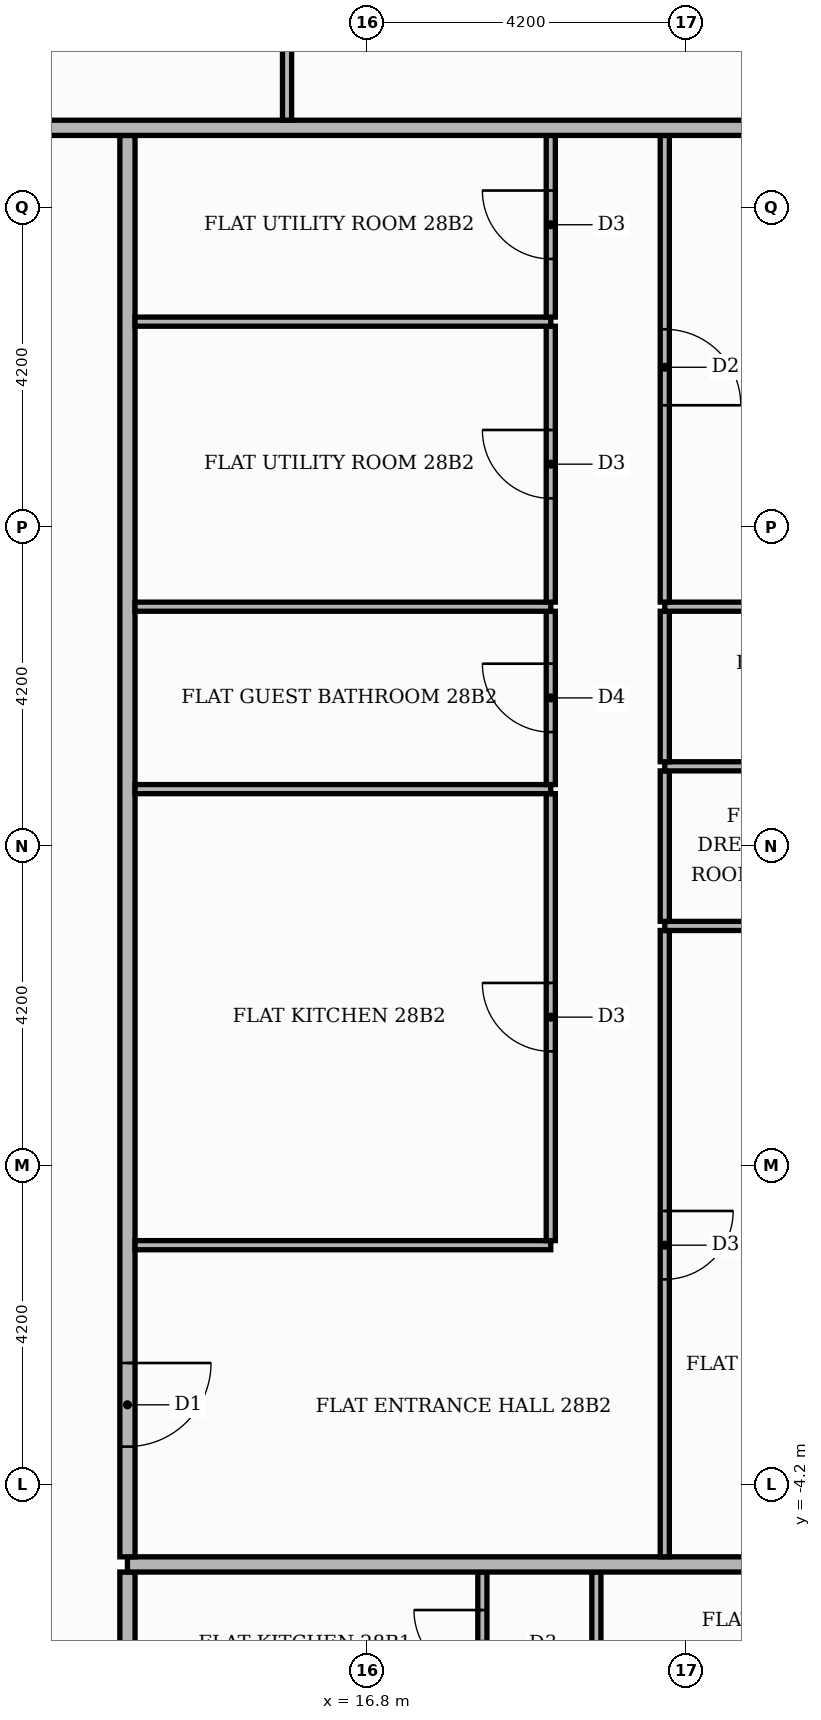
"""IFC4 building model, lengths in metres.
Left out: names, types, materials, properties, quantities, classifications, styles, units other than length and angle.
Written with IfcOpenShell. Run it as: python <this file> out.ifc"""

import sys

from ifc_helpers import new_model, si_unit, direction, frame, frame_2d, origin, place, context, subcontext, project, spatial, rectangle, extrude, element, fill, save


model = new_model("IFC4")
c1 = context("Model", 3, precision=1e-05, world=origin(), true_north=direction((0.0, 1.0)))
c2 = subcontext(c1, "Body", "Model", "MODEL_VIEW")
j1 = project(units=[si_unit("LENGTHUNIT", "METRE"), si_unit("PLANEANGLEUNIT", "RADIAN")], contexts=[c1])
p1 = place(None, origin())
s1 = spatial("IfcSite", under=j1, at=p1, CompositionType="ELEMENT")
p2 = place(p1, origin())
s2 = spatial("IfcBuilding", under=s1, at=p2, CompositionType="ELEMENT")
p3 = place(p2, frame((0.0, 0.0, 118.2)))
s3 = spatial("IfcBuildingStorey", under=s2, at=p3, CompositionType="ELEMENT", Elevation=118.2)
p4 = place(p3, frame((13.65, -13.55, 0.0), z_axis=(0.0, 0.0, 1.0), x_axis=(0.0, 1.0, 0.0)))
e1 = element("IfcWall", 1, at=p4, inside=s3, PredefinedType="PARTITIONING", context=c2, shape_type="SweptSolid", body=[
    extrude(rectangle(XDim=8.2, YDim=0.2, at=frame_2d((4.1, 0.0))), origin(), (0.0, 0.0, 1.0), 3.48),
])
p5 = place(p4, frame((1.45, 0.0, 0.0)))
e2 = element("IfcOpeningElement", 2, at=p5, cuts=e1, PredefinedType="OPENING", context=c2, shape_type="SweptSolid", body=[
    extrude(rectangle(XDim=1.1, YDim=2.4, at=frame_2d((0.55, 1.2))), frame((0.0, 0.11, 0.0), z_axis=(0.0, -1.0, 0.0), x_axis=(1.0, 0.0, 0.0)), (0.0, 0.0, 1.0), 0.22),
])
p6 = place(p3, frame((18.32, -7.29, 0.0), z_axis=(0.0, 0.0, 1.0), x_axis=(0.0, 1.0, 0.0)))
e3 = element("IfcWall", 3, at=p6, inside=s3, PredefinedType="PARTITIONING", context=c2, shape_type="SweptSolid", body=[
    extrude(rectangle(XDim=1.94, YDim=0.12, at=frame_2d((0.97, 0.0))), origin(), (0.0, 0.0, 1.0), 3.48),
])
p7 = place(p6, frame((0.54, 0.0, 0.0)))
e4 = element("IfcOpeningElement", 4, at=p7, cuts=e3, PredefinedType="OPENING", context=c2, shape_type="SweptSolid", body=[
    extrude(rectangle(XDim=0.9, YDim=2.1, at=frame_2d((0.45, 1.05))), frame((0.0, 0.07, 0.0), z_axis=(0.0, -1.0, 0.0), x_axis=(1.0, 0.0, 0.0)), (0.0, 0.0, 1.0), 0.14),
])
p8 = place(p3, frame((19.82, -7.29, 0.0), z_axis=(0.0, 0.0, 1.0), x_axis=(0.0, 1.0, 0.0)))
e5 = element("IfcWall", 5, at=p8, inside=s3, PredefinedType="PARTITIONING", context=c2, shape_type="SweptSolid", body=[
    extrude(rectangle(XDim=1.94, YDim=0.12, at=frame_2d((0.97, 0.0))), origin(), (0.0, 0.0, 1.0), 3.48),
])
p9 = place(p3, frame((13.65, -5.25, 0.0), z_axis=(0.0, 0.0, 1.0), x_axis=(1.0, 0.0, 0.0)))
e6 = element("IfcWall", 6, at=p9, inside=s3, PredefinedType="PARTITIONING", context=c2, shape_type="SweptSolid", body=[
    extrude(rectangle(XDim=11.77, YDim=0.2, at=frame_2d((5.885, 0.0))), origin(), (0.0, 0.0, 1.0), 3.48),
])
p10 = place(p3, frame((13.65, -5.15, 0.0), z_axis=(0.0, 0.0, 1.0), x_axis=(0.0, 1.0, 0.0)))
e7 = element("IfcWall", 7, at=p10, inside=s3, PredefinedType="PARTITIONING", context=c2, shape_type="SweptSolid", body=[
    extrude(rectangle(XDim=18.7, YDim=0.2, at=frame_2d((9.35, 0.0))), origin(), (0.0, 0.0, 1.0), 3.48),
])
p11 = place(p10, frame((1.45, 0.0, 0.0)))
e8 = element("IfcOpeningElement", 8, at=p11, cuts=e7, PredefinedType="OPENING", context=c2, shape_type="SweptSolid", body=[
    extrude(rectangle(XDim=1.1, YDim=2.4, at=frame_2d((0.55, 1.2))), frame((0.0, 0.11, 0.0), z_axis=(0.0, -1.0, 0.0), x_axis=(1.0, 0.0, 0.0)), (0.0, 0.0, 1.0), 0.22),
])
p12 = place(p3, frame((20.72, -5.15, 0.0), z_axis=(0.0, 0.0, 1.0), x_axis=(0.0, 1.0, 0.0)))
e9 = element("IfcWall", 9, at=p12, inside=s3, PredefinedType="PARTITIONING", context=c2, shape_type="SweptSolid", body=[
    extrude(rectangle(XDim=8.24, YDim=0.12, at=frame_2d((4.12, 0.0))), origin(), (0.0, 0.0, 1.0), 3.48),
])
p13 = place(p12, frame((3.65, 0.0, 0.0)))
e10 = element("IfcOpeningElement", 10, at=p13, cuts=e9, PredefinedType="OPENING", context=c2, shape_type="SweptSolid", body=[
    extrude(rectangle(XDim=0.9, YDim=2.1, at=frame_2d((0.45, 1.05))), frame((0.0, 0.07, 0.0), z_axis=(0.0, -1.0, 0.0), x_axis=(1.0, 0.0, 0.0)), (0.0, 0.0, 1.0), 0.14),
])
p14 = place(p3, frame((13.75, -1.05, 0.0), z_axis=(0.0, 0.0, 1.0), x_axis=(1.0, 0.0, 0.0)))
e11 = element("IfcWall", 11, at=p14, inside=s3, PredefinedType="PARTITIONING", context=c2, shape_type="SweptSolid", body=[
    extrude(rectangle(XDim=5.47, YDim=0.12, at=frame_2d((2.735, 0.0))), origin(), (0.0, 0.0, 1.0), 3.48),
])
p15 = place(p3, frame((19.22, -0.99, 0.0), z_axis=(0.0, 0.0, 1.0), x_axis=(0.0, 1.0, 0.0)))
e12 = element("IfcWall", 12, at=p15, inside=s3, PredefinedType="PARTITIONING", context=c2, shape_type="SweptSolid", body=[
    extrude(rectangle(XDim=5.88, YDim=0.12, at=frame_2d((2.94, 0.0))), origin(), (0.0, 0.0, 1.0), 3.48),
])
p16 = place(p15, frame((2.49, 0.0, 0.0)))
e13 = element("IfcOpeningElement", 13, at=p16, cuts=e12, PredefinedType="OPENING", context=c2, shape_type="SweptSolid", body=[
    extrude(rectangle(XDim=0.9, YDim=2.1, at=frame_2d((0.45, 1.05))), frame((0.0, 0.07, 0.0), z_axis=(0.0, -1.0, 0.0), x_axis=(1.0, 0.0, 0.0)), (0.0, 0.0, 1.0), 0.14),
])
p17 = place(p3, frame((20.72, 3.15, 0.0), z_axis=(0.0, 0.0, 1.0), x_axis=(1.0, 0.0, 0.0)))
e14 = element("IfcWall", 14, at=p17, inside=s3, PredefinedType="PARTITIONING", context=c2, shape_type="SweptSolid", body=[
    extrude(rectangle(XDim=4.7, YDim=0.12, at=frame_2d((2.35, 0.0))), origin(), (0.0, 0.0, 1.0), 3.48),
])
p18 = place(p17, frame((2.05, 0.0, 0.0)))
e15 = element("IfcOpeningElement", 15, at=p18, cuts=e14, PredefinedType="OPENING", context=c2, shape_type="SweptSolid", body=[
    extrude(rectangle(XDim=0.9, YDim=2.1, at=frame_2d((0.45, 1.05))), frame((0.0, 0.07, 0.0), z_axis=(0.0, -1.0, 0.0), x_axis=(1.0, 0.0, 0.0)), (0.0, 0.0, 1.0), 0.14),
])
p19 = place(p3, frame((20.72, 3.21, 0.0), z_axis=(0.0, 0.0, 1.0), x_axis=(0.0, 1.0, 0.0)))
e16 = element("IfcWall", 16, at=p19, inside=s3, PredefinedType="PARTITIONING", context=c2, shape_type="SweptSolid", body=[
    extrude(rectangle(XDim=1.98, YDim=0.12, at=frame_2d((0.99, 0.0))), origin(), (0.0, 0.0, 1.0), 3.48),
])
p20 = place(p3, frame((13.75, 4.95, 0.0), z_axis=(0.0, 0.0, 1.0), x_axis=(1.0, 0.0, 0.0)))
e17 = element("IfcWall", 17, at=p20, inside=s3, PredefinedType="PARTITIONING", context=c2, shape_type="SweptSolid", body=[
    extrude(rectangle(XDim=5.47, YDim=0.12, at=frame_2d((2.735, 0.0))), origin(), (0.0, 0.0, 1.0), 3.48),
])
p21 = place(p3, frame((19.22, 5.01, 0.0), z_axis=(0.0, 0.0, 1.0), x_axis=(0.0, 1.0, 0.0)))
e18 = element("IfcWall", 18, at=p21, inside=s3, PredefinedType="PARTITIONING", context=c2, shape_type="SweptSolid", body=[
    extrude(rectangle(XDim=2.28, YDim=0.12, at=frame_2d((1.14, 0.0))), origin(), (0.0, 0.0, 1.0), 3.48),
])
p22 = place(p21, frame((0.69, 0.0, 0.0)))
e19 = element("IfcOpeningElement", 19, at=p22, cuts=e18, PredefinedType="OPENING", context=c2, shape_type="SweptSolid", body=[
    extrude(rectangle(XDim=0.9, YDim=2.1, at=frame_2d((0.45, 1.05))), frame((0.0, 0.07, 0.0), z_axis=(0.0, -1.0, 0.0), x_axis=(1.0, 0.0, 0.0)), (0.0, 0.0, 1.0), 0.14),
])
p23 = place(p3, frame((20.72, 5.25, 0.0), z_axis=(0.0, 0.0, 1.0), x_axis=(1.0, 0.0, 0.0)))
e20 = element("IfcWall", 20, at=p23, inside=s3, PredefinedType="PARTITIONING", context=c2, shape_type="SweptSolid", body=[
    extrude(rectangle(XDim=4.7, YDim=0.12, at=frame_2d((2.35, 0.0))), origin(), (0.0, 0.0, 1.0), 3.48),
])
p24 = place(p23, frame((2.05, 0.0, 0.0)))
e21 = element("IfcOpeningElement", 21, at=p24, cuts=e20, PredefinedType="OPENING", context=c2, shape_type="SweptSolid", body=[
    extrude(rectangle(XDim=0.9, YDim=2.1, at=frame_2d((0.45, 1.05))), frame((0.0, 0.07, 0.0), z_axis=(0.0, -1.0, 0.0), x_axis=(1.0, 0.0, 0.0)), (0.0, 0.0, 1.0), 0.14),
])
p25 = place(p3, frame((20.72, 5.31, 0.0), z_axis=(0.0, 0.0, 1.0), x_axis=(0.0, 1.0, 0.0)))
e22 = element("IfcWall", 22, at=p25, inside=s3, PredefinedType="PARTITIONING", context=c2, shape_type="SweptSolid", body=[
    extrude(rectangle(XDim=1.98, YDim=0.12, at=frame_2d((0.99, 0.0))), origin(), (0.0, 0.0, 1.0), 3.48),
])
p26 = place(p3, frame((13.75, 7.35, 0.0), z_axis=(0.0, 0.0, 1.0), x_axis=(1.0, 0.0, 0.0)))
e23 = element("IfcWall", 23, at=p26, inside=s3, PredefinedType="PARTITIONING", context=c2, shape_type="SweptSolid", body=[
    extrude(rectangle(XDim=5.47, YDim=0.12, at=frame_2d((2.735, 0.0))), origin(), (0.0, 0.0, 1.0), 3.48),
])
p27 = place(p3, frame((20.72, 7.35, 0.0), z_axis=(0.0, 0.0, 1.0), x_axis=(1.0, 0.0, 0.0)))
e24 = element("IfcWall", 24, at=p27, inside=s3, PredefinedType="PARTITIONING", context=c2, shape_type="SweptSolid", body=[
    extrude(rectangle(XDim=4.7, YDim=0.12, at=frame_2d((2.35, 0.0))), origin(), (0.0, 0.0, 1.0), 3.48),
])
p28 = place(p3, frame((19.22, 7.41, 0.0), z_axis=(0.0, 0.0, 1.0), x_axis=(0.0, 1.0, 0.0)))
e25 = element("IfcWall", 25, at=p28, inside=s3, PredefinedType="PARTITIONING", context=c2, shape_type="SweptSolid", body=[
    extrude(rectangle(XDim=3.63, YDim=0.12, at=frame_2d((1.815, 0.0))), origin(), (0.0, 0.0, 1.0), 3.48),
])
p29 = place(p28, frame((1.365, 0.0, 0.0)))
e26 = element("IfcOpeningElement", 26, at=p29, cuts=e25, PredefinedType="OPENING", context=c2, shape_type="SweptSolid", body=[
    extrude(rectangle(XDim=0.9, YDim=2.1, at=frame_2d((0.45, 1.05))), frame((0.0, 0.07, 0.0), z_axis=(0.0, -1.0, 0.0), x_axis=(1.0, 0.0, 0.0)), (0.0, 0.0, 1.0), 0.14),
])
p30 = place(p3, frame((20.72, 7.41, 0.0), z_axis=(0.0, 0.0, 1.0), x_axis=(0.0, 1.0, 0.0)))
e27 = element("IfcWall", 27, at=p30, inside=s3, PredefinedType="PARTITIONING", context=c2, shape_type="SweptSolid", body=[
    extrude(rectangle(XDim=6.14, YDim=0.12, at=frame_2d((3.07, 0.0))), origin(), (0.0, 0.0, 1.0), 3.48),
])
p31 = place(p30, frame((2.59, 0.0, 0.0)))
e28 = element("IfcOpeningElement", 28, at=p31, cuts=e27, PredefinedType="OPENING", context=c2, shape_type="SweptSolid", body=[
    extrude(rectangle(XDim=1.0, YDim=2.1, at=frame_2d((0.5, 1.05))), frame((0.0, 0.07, 0.0), z_axis=(0.0, -1.0, 0.0), x_axis=(1.0, 0.0, 0.0)), (0.0, 0.0, 1.0), 0.14),
])
p32 = place(p3, frame((13.75, 11.1, 0.0), z_axis=(0.0, 0.0, 1.0), x_axis=(1.0, 0.0, 0.0)))
e29 = element("IfcWall", 29, at=p32, inside=s3, PredefinedType="PARTITIONING", context=c2, shape_type="SweptSolid", body=[
    extrude(rectangle(XDim=5.47, YDim=0.12, at=frame_2d((2.735, 0.0))), origin(), (0.0, 0.0, 1.0), 3.48),
])
p33 = place(p3, frame((19.22, 11.16, 0.0), z_axis=(0.0, 0.0, 1.0), x_axis=(0.0, 1.0, 0.0)))
e30 = element("IfcWall", 30, at=p33, inside=s3, PredefinedType="PARTITIONING", context=c2, shape_type="SweptSolid", body=[
    extrude(rectangle(XDim=2.39, YDim=0.12, at=frame_2d((1.195, 0.0))), origin(), (0.0, 0.0, 1.0), 3.48),
])
p34 = place(p33, frame((0.765, 0.0, 0.0)))
e31 = element("IfcOpeningElement", 31, at=p34, cuts=e30, PredefinedType="OPENING", context=c2, shape_type="SweptSolid", body=[
    extrude(rectangle(XDim=0.9, YDim=2.1, at=frame_2d((0.45, 1.05))), frame((0.0, 0.07, 0.0), z_axis=(0.0, -1.0, 0.0), x_axis=(1.0, 0.0, 0.0)), (0.0, 0.0, 1.0), 0.14),
])
p35 = place(p3, frame((-13.65, 13.65, 0.0), z_axis=(0.0, 0.0, 1.0), x_axis=(1.0, 0.0, 0.0)))
e32 = element("IfcWall", 32, at=p35, inside=s3, PredefinedType="PARTITIONING", context=c2, shape_type="SweptSolid", body=[
    extrude(rectangle(XDim=39.07, YDim=0.2, at=frame_2d((19.535, 0.0))), origin(), (0.0, 0.0, 1.0), 3.48),
])
p36 = place(p35, frame((24.65, 0.0, 0.0)))
e33 = element("IfcOpeningElement", 33, at=p36, cuts=e32, PredefinedType="OPENING", context=c2, shape_type="SweptSolid", body=[
    extrude(rectangle(XDim=1.1, YDim=2.4, at=frame_2d((0.55, 1.2))), frame((0.0, 0.11, 0.0), z_axis=(0.0, -1.0, 0.0), x_axis=(1.0, 0.0, 0.0)), (0.0, 0.0, 1.0), 0.22),
])
p37 = place(p35, frame((14.15, 0.0, 0.0)))
e34 = element("IfcOpeningElement", 34, at=p37, cuts=e32, PredefinedType="OPENING", context=c2, shape_type="SweptSolid", body=[
    extrude(rectangle(XDim=1.1, YDim=2.4, at=frame_2d((0.55, 1.2))), frame((0.0, 0.11, 0.0), z_axis=(0.0, -1.0, 0.0), x_axis=(1.0, 0.0, 0.0)), (0.0, 0.0, 1.0), 0.22),
])
p38 = place(p3, frame((15.75, 13.75, 0.0), z_axis=(0.0, 0.0, 1.0), x_axis=(0.0, 1.0, 0.0)))
e35 = element("IfcWall", 35, at=p38, inside=s3, PredefinedType="PARTITIONING", context=c2, shape_type="SweptSolid", body=[
    extrude(rectangle(XDim=6.01, YDim=0.12, at=frame_2d((3.005, 0.0))), origin(), (0.0, 0.0, 1.0), 3.48),
])
p39 = place(p38, frame((2.485, 0.0, 0.0)))
e36 = element("IfcOpeningElement", 36, at=p39, cuts=e35, PredefinedType="OPENING", context=c2, shape_type="SweptSolid", body=[
    extrude(rectangle(XDim=1.0, YDim=2.1, at=frame_2d((0.5, 1.05))), frame((0.0, 0.07, 0.0), z_axis=(0.0, -1.0, 0.0), x_axis=(1.0, 0.0, 0.0)), (0.0, 0.0, 1.0), 0.14),
])
p40 = place(p7, origin())
e37 = element("IfcDoor", 37, at=p40, inside=s3, OperationType="SINGLE_SWING_RIGHT", PredefinedType="DOOR", context=c2, shape_type="SweptSolid", body=[
    extrude(rectangle(XDim=0.9, YDim=2.1, at=frame_2d((0.45, 1.05))), frame((0.0, 0.025, 0.0), z_axis=(0.0, -1.0, 0.0), x_axis=(1.0, 0.0, 0.0)), (0.0, 0.0, 1.0), 0.05),
])
fill(e4, e37)
p41 = place(p11, frame((1.1, 0.0, 0.0), z_axis=(0.0, 0.0, 1.0), x_axis=(-1.0, 0.0, 0.0)))
e38 = element("IfcDoor", 38, at=p41, inside=s3, OperationType="SINGLE_SWING_RIGHT", PredefinedType="DOOR", context=c2, shape_type="SweptSolid", body=[
    extrude(rectangle(XDim=1.1, YDim=2.4, at=frame_2d((0.55, 1.2))), frame((0.0, 0.025, 0.0), z_axis=(0.0, -1.0, 0.0), x_axis=(1.0, 0.0, 0.0)), (0.0, 0.0, 1.0), 0.05),
])
fill(e8, e38)
p42 = place(p16, origin())
e39 = element("IfcDoor", 39, at=p42, inside=s3, OperationType="SINGLE_SWING_RIGHT", PredefinedType="DOOR", context=c2, shape_type="SweptSolid", body=[
    extrude(rectangle(XDim=0.9, YDim=2.1, at=frame_2d((0.45, 1.05))), frame((0.0, 0.025, 0.0), z_axis=(0.0, -1.0, 0.0), x_axis=(1.0, 0.0, 0.0)), (0.0, 0.0, 1.0), 0.05),
])
fill(e13, e39)
p43 = place(p22, origin())
e40 = element("IfcDoor", 40, at=p43, inside=s3, OperationType="SINGLE_SWING_RIGHT", PredefinedType="DOOR", context=c2, shape_type="SweptSolid", body=[
    extrude(rectangle(XDim=0.9, YDim=2.1, at=frame_2d((0.45, 1.05))), frame((0.0, 0.025, 0.0), z_axis=(0.0, -1.0, 0.0), x_axis=(1.0, 0.0, 0.0)), (0.0, 0.0, 1.0), 0.05),
])
fill(e19, e40)
p44 = place(p29, origin())
e41 = element("IfcDoor", 41, at=p44, inside=s3, OperationType="SINGLE_SWING_RIGHT", PredefinedType="DOOR", context=c2, shape_type="SweptSolid", body=[
    extrude(rectangle(XDim=0.9, YDim=2.1, at=frame_2d((0.45, 1.05))), frame((0.0, 0.025, 0.0), z_axis=(0.0, -1.0, 0.0), x_axis=(1.0, 0.0, 0.0)), (0.0, 0.0, 1.0), 0.05),
])
fill(e26, e41)
p45 = place(p34, origin())
e42 = element("IfcDoor", 42, at=p45, inside=s3, OperationType="SINGLE_SWING_RIGHT", PredefinedType="DOOR", context=c2, shape_type="SweptSolid", body=[
    extrude(rectangle(XDim=0.9, YDim=2.1, at=frame_2d((0.45, 1.05))), frame((0.0, 0.025, 0.0), z_axis=(0.0, -1.0, 0.0), x_axis=(1.0, 0.0, 0.0)), (0.0, 0.0, 1.0), 0.05),
])
fill(e31, e42)
p46 = place(p13, frame((0.9, 0.0, 0.0), z_axis=(0.0, 0.0, 1.0), x_axis=(-1.0, 0.0, 0.0)))
e43 = element("IfcDoor", 43, at=p46, inside=s3, OperationType="SINGLE_SWING_RIGHT", PredefinedType="DOOR", context=c2, shape_type="SweptSolid", body=[
    extrude(rectangle(XDim=0.9, YDim=2.1, at=frame_2d((0.45, 1.05))), frame((0.0, 0.025, 0.0), z_axis=(0.0, -1.0, 0.0), x_axis=(1.0, 0.0, 0.0)), (0.0, 0.0, 1.0), 0.05),
])
fill(e10, e43)
p47 = place(p31, frame((1.0, 0.0, 0.0), z_axis=(0.0, 0.0, 1.0), x_axis=(-1.0, 0.0, 0.0)))
e44 = element("IfcDoor", 44, at=p47, inside=s3, OperationType="SINGLE_SWING_LEFT", PredefinedType="DOOR", context=c2, shape_type="SweptSolid", body=[
    extrude(rectangle(XDim=1.0, YDim=2.1, at=frame_2d((0.5, 1.05))), frame((0.0, 0.025, 0.0), z_axis=(0.0, -1.0, 0.0), x_axis=(1.0, 0.0, 0.0)), (0.0, 0.0, 1.0), 0.05),
])
fill(e28, e44)
save(model, sys.argv[1])
